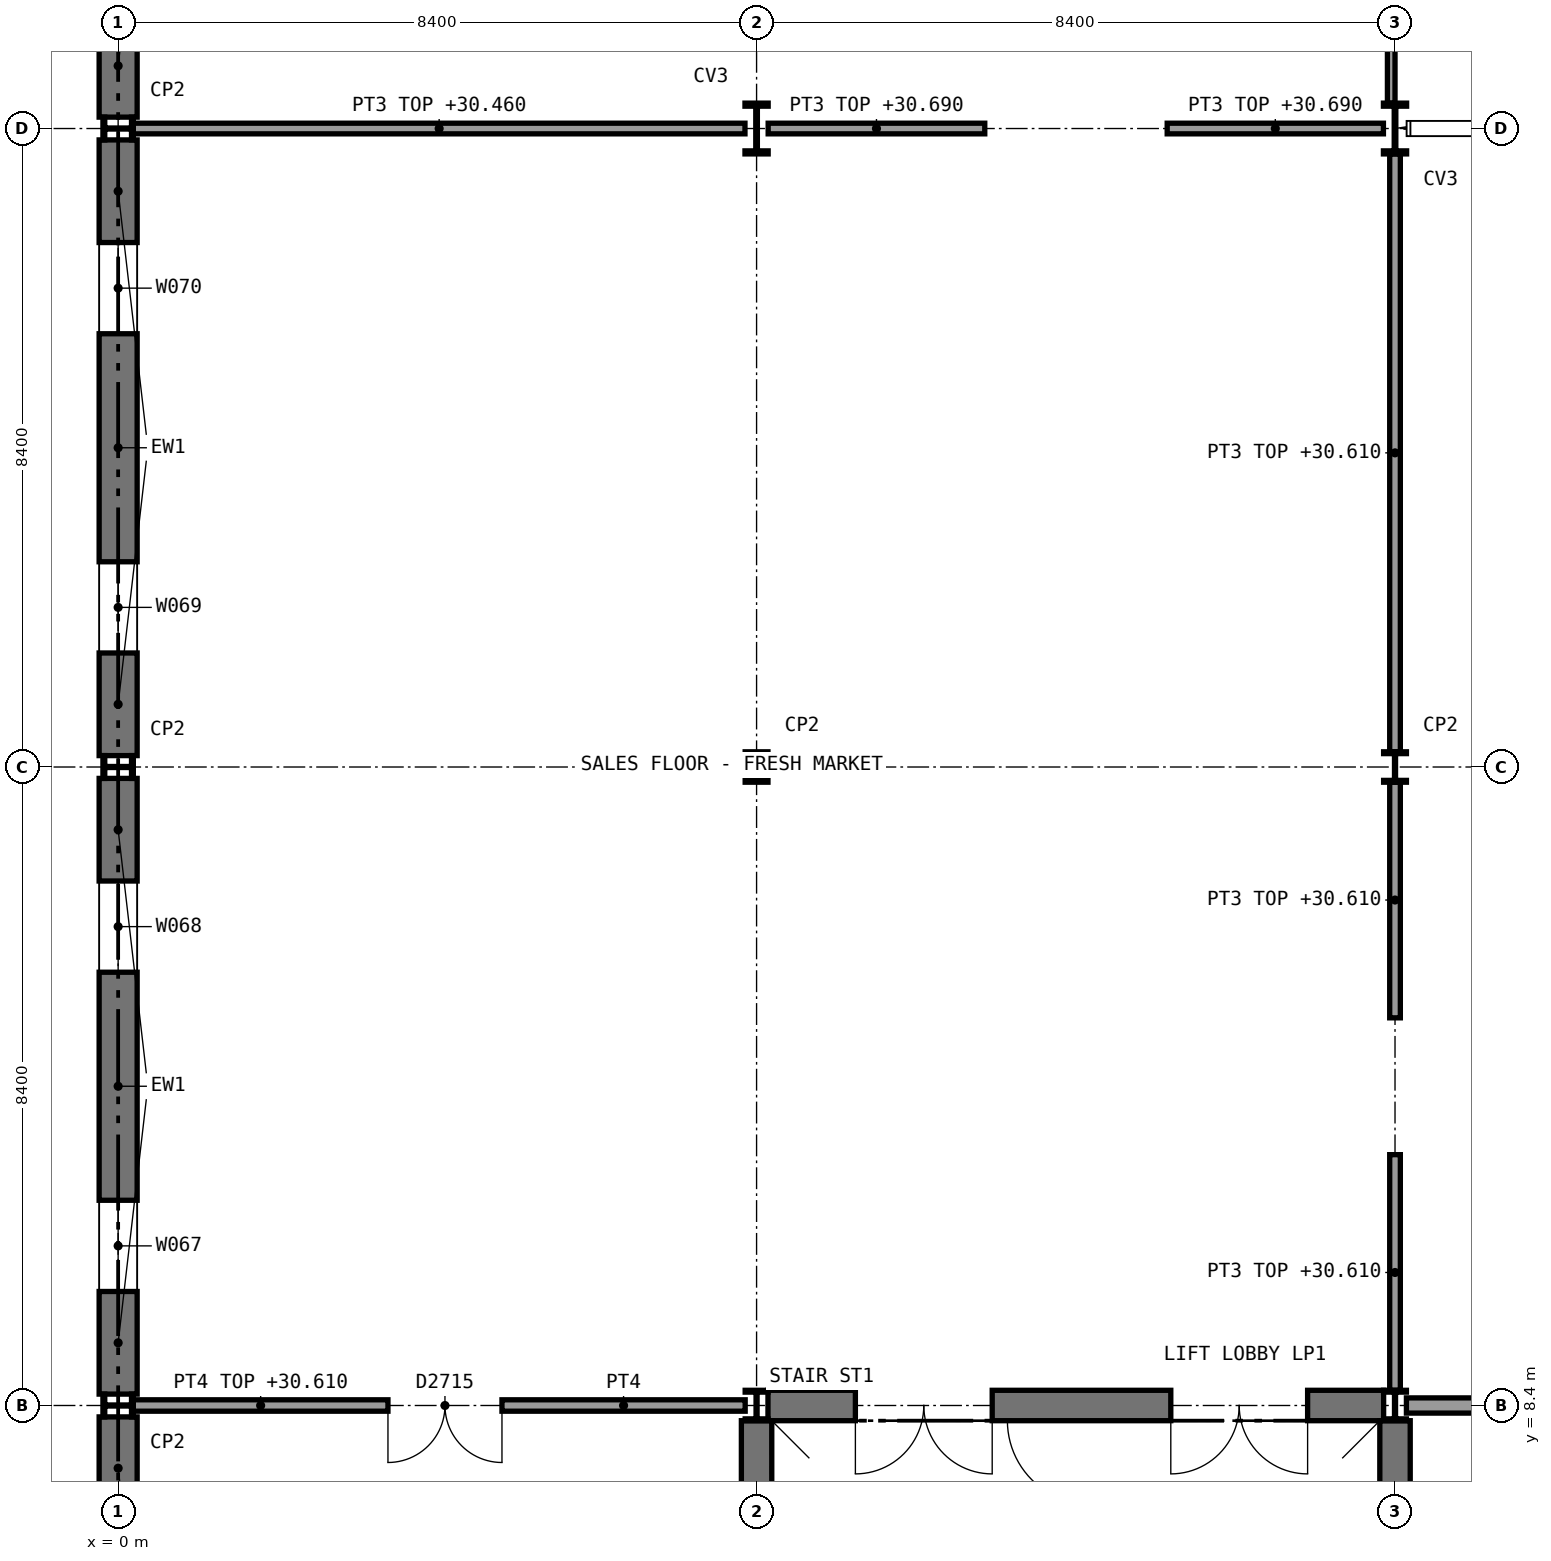
"""IFC4 building model, lengths in metres.
Left out: names, types, materials, properties, quantities, classifications, styles, units other than length and angle.
Written with IfcOpenShell. Run it as: python <this file> out.ifc"""

import sys

from ifc_helpers import new_model, si_unit, direction, frame, frame_2d, origin, origin_2d, place, context, subcontext, project, spatial, rectangle, i_section, extrude, element, fill, save


model = new_model("IFC4")
c1 = context("Model", 3, precision=1e-05, world=origin(), true_north=direction((0.0, 1.0)))
c2 = subcontext(c1, "Body", "Model", "MODEL_VIEW")
j1 = project(units=[si_unit("LENGTHUNIT", "METRE"), si_unit("PLANEANGLEUNIT", "RADIAN")], contexts=[c1])
p1 = place(None, origin())
s1 = spatial("IfcSite", under=j1, at=p1, CompositionType="ELEMENT")
p2 = place(p1, origin())
s2 = spatial("IfcBuilding", under=s1, at=p2, CompositionType="ELEMENT")
p3 = place(p2, frame((0.0, 0.0, 25.8)))
s3 = spatial("IfcBuildingStorey", under=s2, at=p3, CompositionType="ELEMENT", Elevation=25.8)
p4 = place(p3, frame((8.55, 8.4, 0.0), z_axis=(0.0, 0.0, 1.0), x_axis=(1.0, 0.0, 0.0)))
e1 = element("IfcWall", 1, at=p4, inside=s3, PredefinedType="SHEAR", context=c2, shape_type="SweptSolid", body=[
    extrude(rectangle(XDim=8.1, YDim=0.4, at=frame_2d((4.05, 0.0))), origin(), (0.0, 0.0, 1.0), 4.51),
])
p5 = place(p4, frame((1.15, 0.0, 0.0)))
e2 = element("IfcOpeningElement", 2, at=p5, cuts=e1, PredefinedType="OPENING", context=c2, shape_type="SweptSolid", body=[
    extrude(rectangle(XDim=1.8, YDim=2.1, at=frame_2d((0.9, 1.05))), frame((0.0, 0.21, 0.0), z_axis=(0.0, -1.0, 0.0), x_axis=(1.0, 0.0, 0.0)), (0.0, 0.0, 1.0), 0.42),
])
p6 = place(p4, frame((5.3, 0.0, 0.0)))
e3 = element("IfcOpeningElement", 3, at=p6, cuts=e1, PredefinedType="OPENING", context=c2, shape_type="SweptSolid", body=[
    extrude(rectangle(XDim=1.8, YDim=2.1, at=frame_2d((0.9, 1.05))), frame((0.0, 0.21, 0.0), z_axis=(0.0, -1.0, 0.0), x_axis=(1.0, 0.0, 0.0)), (0.0, 0.0, 1.0), 0.42),
])
for number, where, z_axis, x_axis in (
    (4, (8.4, 0.2, 0.0), (0.0, 0.0, 1.0), (0.0, 1.0, 0.0)),
    (5, (16.8, 0.2, 0.0), (0.0, 0.0, 1.0), (0.0, 1.0, 0.0)),
):
    element("IfcWall", number, at=place(p3, frame(where, z_axis=z_axis, x_axis=x_axis)), inside=s3, PredefinedType="SHEAR", context=c2, shape_type="SweptSolid", body=[
        extrude(rectangle(XDim=8.0, YDim=0.4, at=frame_2d((4.0, 0.0))), origin(), (0.0, 0.0, 1.0), 5.2),
    ])
for number, where, z_axis, x_axis in (
    (6, (0.0, 8.4, 0.0), (0.0, 0.0, 1.0), (0.0, 1.0, 0.0)),
    (7, (0.0, 16.8, 0.0), (0.0, 0.0, 1.0), (0.0, 1.0, 0.0)),
    (8, (0.0, 25.2, 0.0), (0.0, 0.0, 1.0), (0.0, 1.0, 0.0)),
    (9, (8.4, 8.4, 0.0), (0.0, 0.0, 1.0), (1.0, 0.0, 0.0)),
    (10, (8.4, 16.8, 0.0), (0.0, 0.0, 1.0), (1.0, 0.0, 0.0)),
):
    element("IfcColumn", number, at=place(p3, frame(where, z_axis=z_axis, x_axis=x_axis)), inside=s3, PredefinedType="COLUMN", context=c2, shape_type="SweptSolid", body=[
        extrude(i_section(OverallWidth=0.3, OverallDepth=0.4, WebThickness=0.013, FlangeThickness=0.024, FilletRadius=0.027, at=origin_2d()), origin(), (0.0, 0.0, 1.0), 5.4),
    ])
p7 = place(p3, frame((8.4, 25.2, 0.0), z_axis=(0.0, 0.0, 1.0), x_axis=(1.0, 0.0, 0.0)))
e11 = element("IfcColumn", 11, at=p7, inside=s3, PredefinedType="COLUMN", context=c2, shape_type="SweptSolid", body=[
    extrude(i_section(OverallWidth=0.305, OverallDepth=0.668, WebThickness=0.021, FlangeThickness=0.04, FilletRadius=0.027, at=origin_2d()), origin(), (0.0, 0.0, 1.0), 5.4),
])
for number, where, z_axis, x_axis in (
    (12, (16.8, 8.4, 0.0), (0.0, 0.0, 1.0), (1.0, 0.0, 0.0)),
    (13, (16.8, 16.8, 0.0), (0.0, 0.0, 1.0), (1.0, 0.0, 0.0)),
):
    element("IfcColumn", number, at=place(p3, frame(where, z_axis=z_axis, x_axis=x_axis)), inside=s3, PredefinedType="COLUMN", context=c2, shape_type="SweptSolid", body=[
        extrude(i_section(OverallWidth=0.3, OverallDepth=0.4, WebThickness=0.013, FlangeThickness=0.024, FilletRadius=0.027, at=origin_2d()), origin(), (0.0, 0.0, 1.0), 5.4),
    ])
p8 = place(p3, frame((16.8, 25.2, 0.0), z_axis=(0.0, 0.0, 1.0), x_axis=(1.0, 0.0, 0.0)))
e14 = element("IfcColumn", 14, at=p8, inside=s3, PredefinedType="COLUMN", context=c2, shape_type="SweptSolid", body=[
    extrude(i_section(OverallWidth=0.305, OverallDepth=0.668, WebThickness=0.021, FlangeThickness=0.04, FilletRadius=0.027, at=origin_2d()), origin(), (0.0, 0.0, 1.0), 5.4),
])
p9 = place(p3, frame((16.95, 8.4, 0.0), z_axis=(0.0, 0.0, 1.0), x_axis=(1.0, 0.0, 0.0)))
e15 = element("IfcWall", 15, at=p9, inside=s3, PredefinedType="SOLIDWALL", context=c2, shape_type="SweptSolid", body=[
    extrude(rectangle(XDim=8.1, YDim=0.2, at=frame_2d((4.05, 0.0))), origin(), (0.0, 0.0, 1.0), 4.89),
])
p10 = place(p9, frame((3.35, 0.0, 0.0)))
e16 = element("IfcOpeningElement", 16, at=p10, cuts=e15, PredefinedType="OPENING", context=c2, shape_type="SweptSolid", body=[
    extrude(rectangle(XDim=1.2, YDim=2.1, at=frame_2d((0.6, 1.05))), frame((0.0, 0.11, 0.0), z_axis=(0.0, -1.0, 0.0), x_axis=(1.0, 0.0, 0.0)), (0.0, 0.0, 1.0), 0.22),
])
p11 = place(p3, frame((0.2, 8.4, 0.0), z_axis=(0.0, 0.0, 1.0), x_axis=(1.0, 0.0, 0.0)))
e17 = element("IfcWall", 17, at=p11, inside=s3, PredefinedType="SOLIDWALL", context=c2, shape_type="SweptSolid", body=[
    extrude(rectangle(XDim=8.05, YDim=0.15, at=frame_2d((4.025, 0.0))), origin(), (0.0, 0.0, 1.0), 4.81),
])
p12 = place(p11, frame((3.35, 0.0, 0.0)))
e18 = element("IfcOpeningElement", 18, at=p12, cuts=e17, PredefinedType="OPENING", context=c2, shape_type="SweptSolid", body=[
    extrude(rectangle(XDim=1.5, YDim=2.1, at=frame_2d((0.75, 1.05))), frame((0.0, 0.085, 0.0), z_axis=(0.0, -1.0, 0.0), x_axis=(1.0, 0.0, 0.0)), (0.0, 0.0, 1.0), 0.17),
])
for number, where, z_axis, x_axis in (
    (19, (16.8, 8.6, 0.0), (0.0, 0.0, 1.0), (0.0, 1.0, 0.0)),
    (20, (16.8, 13.5, 0.0), (0.0, 0.0, 1.0), (0.0, 1.0, 0.0)),
):
    element("IfcWall", number, at=place(p3, frame(where, z_axis=z_axis, x_axis=x_axis)), inside=s3, PredefinedType="PARTITIONING", context=c2, shape_type="SweptSolid", body=[
        extrude(rectangle(XDim=3.1, YDim=0.14, at=frame_2d((1.55, 0.0))), origin(), (0.0, 0.0, 1.0), 4.81),
    ])
p13 = place(p3, frame((16.8, 17.0, 0.0), z_axis=(0.0, 0.0, 1.0), x_axis=(0.0, 1.0, 0.0)))
e21 = element("IfcWall", 21, at=p13, inside=s3, PredefinedType="PARTITIONING", context=c2, shape_type="SweptSolid", body=[
    extrude(rectangle(XDim=7.866, YDim=0.14, at=frame_2d((3.933, 0.0))), origin(), (0.0, 0.0, 1.0), 4.81),
])
p14 = place(p3, frame((0.2, 25.2, 0.0), z_axis=(0.0, 0.0, 1.0), x_axis=(1.0, 0.0, 0.0)))
e22 = element("IfcWall", 22, at=p14, inside=s3, PredefinedType="PARTITIONING", context=c2, shape_type="SweptSolid", body=[
    extrude(rectangle(XDim=8.047, YDim=0.14, at=frame_2d((4.024, 0.0))), origin(), (0.0, 0.0, 1.0), 4.66),
])
p15 = place(p3, frame((8.552, 25.2, 0.0), z_axis=(0.0, 0.0, 1.0), x_axis=(1.0, 0.0, 0.0)))
e23 = element("IfcWall", 23, at=p15, inside=s3, PredefinedType="PARTITIONING", context=c2, shape_type="SweptSolid", body=[
    extrude(rectangle(XDim=2.85, YDim=0.14, at=frame_2d((1.425, 0.0))), origin(), (0.0, 0.0, 1.0), 4.89),
])
p16 = place(p3, frame((13.802, 25.2, 0.0), z_axis=(0.0, 0.0, 1.0), x_axis=(1.0, 0.0, 0.0)))
e24 = element("IfcWall", 24, at=p16, inside=s3, PredefinedType="PARTITIONING", context=c2, shape_type="SweptSolid", body=[
    extrude(rectangle(XDim=2.845, YDim=0.14, at=frame_2d((1.422, 0.0))), origin(), (0.0, 0.0, 1.0), 4.89),
])
p17 = place(p3, frame((0.0, 0.15, 0.0), z_axis=(0.0, 0.0, 1.0), x_axis=(0.0, 1.0, 0.0)))
e25 = element("IfcWall", 25, at=p17, inside=s3, PredefinedType="STANDARD", context=c2, shape_type="SweptSolid", body=[
    extrude(rectangle(XDim=8.1, YDim=0.5, at=frame_2d((4.05, 0.0))), origin(), (0.0, 0.0, 1.0), 5.2),
])
p18 = place(p17, frame((1.35, 0.0, 2.7)))
e26 = element("IfcOpeningElement", 26, at=p18, cuts=e25, PredefinedType="OPENING", context=c2, shape_type="SweptSolid", body=[
    extrude(rectangle(XDim=1.2, YDim=1.2, at=frame_2d((0.6, 0.6))), frame((0.0, 0.26, 0.0), z_axis=(0.0, -1.0, 0.0), x_axis=(1.0, 0.0, 0.0)), (0.0, 0.0, 1.0), 0.52),
])
p19 = place(p17, frame((5.55, 0.0, 2.7)))
e27 = element("IfcOpeningElement", 27, at=p19, cuts=e25, PredefinedType="OPENING", context=c2, shape_type="SweptSolid", body=[
    extrude(rectangle(XDim=1.2, YDim=1.2, at=frame_2d((0.6, 0.6))), frame((0.0, 0.26, 0.0), z_axis=(0.0, -1.0, 0.0), x_axis=(1.0, 0.0, 0.0)), (0.0, 0.0, 1.0), 0.52),
])
p20 = place(p3, frame((0.0, 8.55, 0.0), z_axis=(0.0, 0.0, 1.0), x_axis=(0.0, 1.0, 0.0)))
e28 = element("IfcWall", 28, at=p20, inside=s3, PredefinedType="STANDARD", context=c2, shape_type="SweptSolid", body=[
    extrude(rectangle(XDim=8.1, YDim=0.5, at=frame_2d((4.05, 0.0))), origin(), (0.0, 0.0, 1.0), 5.2),
])
p21 = place(p20, frame((1.35, 0.0, 2.7)))
e29 = element("IfcOpeningElement", 29, at=p21, cuts=e28, PredefinedType="OPENING", context=c2, shape_type="SweptSolid", body=[
    extrude(rectangle(XDim=1.2, YDim=1.2, at=frame_2d((0.6, 0.6))), frame((0.0, 0.26, 0.0), z_axis=(0.0, -1.0, 0.0), x_axis=(1.0, 0.0, 0.0)), (0.0, 0.0, 1.0), 0.52),
])
p22 = place(p20, frame((5.55, 0.0, 2.7)))
e30 = element("IfcOpeningElement", 30, at=p22, cuts=e28, PredefinedType="OPENING", context=c2, shape_type="SweptSolid", body=[
    extrude(rectangle(XDim=1.2, YDim=1.2, at=frame_2d((0.6, 0.6))), frame((0.0, 0.26, 0.0), z_axis=(0.0, -1.0, 0.0), x_axis=(1.0, 0.0, 0.0)), (0.0, 0.0, 1.0), 0.52),
])
p23 = place(p3, frame((0.0, 16.95, 0.0), z_axis=(0.0, 0.0, 1.0), x_axis=(0.0, 1.0, 0.0)))
e31 = element("IfcWall", 31, at=p23, inside=s3, PredefinedType="STANDARD", context=c2, shape_type="SweptSolid", body=[
    extrude(rectangle(XDim=8.1, YDim=0.5, at=frame_2d((4.05, 0.0))), origin(), (0.0, 0.0, 1.0), 5.2),
])
p24 = place(p23, frame((1.35, 0.0, 2.7)))
e32 = element("IfcOpeningElement", 32, at=p24, cuts=e31, PredefinedType="OPENING", context=c2, shape_type="SweptSolid", body=[
    extrude(rectangle(XDim=1.2, YDim=1.2, at=frame_2d((0.6, 0.6))), frame((0.0, 0.26, 0.0), z_axis=(0.0, -1.0, 0.0), x_axis=(1.0, 0.0, 0.0)), (0.0, 0.0, 1.0), 0.52),
])
p25 = place(p23, frame((5.55, 0.0, 2.7)))
e33 = element("IfcOpeningElement", 33, at=p25, cuts=e31, PredefinedType="OPENING", context=c2, shape_type="SweptSolid", body=[
    extrude(rectangle(XDim=1.2, YDim=1.2, at=frame_2d((0.6, 0.6))), frame((0.0, 0.26, 0.0), z_axis=(0.0, -1.0, 0.0), x_axis=(1.0, 0.0, 0.0)), (0.0, 0.0, 1.0), 0.52),
])
p26 = place(p3, frame((0.0, 25.35, 0.0), z_axis=(0.0, 0.0, 1.0), x_axis=(0.0, 1.0, 0.0)))
e34 = element("IfcWall", 34, at=p26, inside=s3, PredefinedType="STANDARD", context=c2, shape_type="SweptSolid", body=[
    extrude(rectangle(XDim=12.3, YDim=0.5, at=frame_2d((6.15, 0.0))), origin(), (0.0, 0.0, 1.0), 5.2),
])
p27 = place(p26, frame((1.35, 0.0, 2.7)))
e35 = element("IfcOpeningElement", 35, at=p27, cuts=e34, PredefinedType="OPENING", context=c2, shape_type="SweptSolid", body=[
    extrude(rectangle(XDim=1.2, YDim=1.2, at=frame_2d((0.6, 0.6))), frame((0.0, 0.26, 0.0), z_axis=(0.0, -1.0, 0.0), x_axis=(1.0, 0.0, 0.0)), (0.0, 0.0, 1.0), 0.52),
])
p28 = place(p26, frame((5.55, 0.0, 2.7)))
e36 = element("IfcOpeningElement", 36, at=p28, cuts=e34, PredefinedType="OPENING", context=c2, shape_type="SweptSolid", body=[
    extrude(rectangle(XDim=1.2, YDim=1.2, at=frame_2d((0.6, 0.6))), frame((0.0, 0.26, 0.0), z_axis=(0.0, -1.0, 0.0), x_axis=(1.0, 0.0, 0.0)), (0.0, 0.0, 1.0), 0.52),
])
p29 = place(p26, frame((9.75, 0.0, 2.7)))
e37 = element("IfcOpeningElement", 37, at=p29, cuts=e34, PredefinedType="OPENING", context=c2, shape_type="SweptSolid", body=[
    extrude(rectangle(XDim=1.2, YDim=1.2, at=frame_2d((0.6, 0.6))), frame((0.0, 0.26, 0.0), z_axis=(0.0, -1.0, 0.0), x_axis=(1.0, 0.0, 0.0)), (0.0, 0.0, 1.0), 0.52),
])
p30 = place(p3, frame((12.8, 0.2, 0.0), z_axis=(0.0, 0.0, 1.0), x_axis=(0.0, 1.0, 0.0)))
e38 = element("IfcWall", 38, at=p30, inside=s3, PredefinedType="SHEAR", context=c2, shape_type="SweptSolid", body=[
    extrude(rectangle(XDim=8.0, YDim=0.2, at=frame_2d((4.0, 0.0))), origin(), (0.0, 0.0, 1.0), 5.2),
])
p31 = place(p30, frame((6.9, 0.0, 0.0)))
e39 = element("IfcOpeningElement", 39, at=p31, cuts=e38, PredefinedType="OPENING", context=c2, shape_type="SweptSolid", body=[
    extrude(rectangle(XDim=1.11, YDim=2.1, at=frame_2d((0.555, 1.05))), frame((0.0, 0.11, 0.0), z_axis=(0.0, -1.0, 0.0), x_axis=(1.0, 0.0, 0.0)), (0.0, 0.0, 1.0), 0.22),
])
p32 = place(p3, frame((16.75, 25.534, 0.0), z_axis=(0.0, 0.0, 1.0), x_axis=(0.0, 1.0, 0.0)))
e40 = element("IfcWall", 40, at=p32, inside=s3, PredefinedType="PARTITIONING", context=c2, shape_type="SweptSolid", body=[
    extrude(rectangle(XDim=11.932, YDim=0.1, at=frame_2d((5.966, 0.0))), origin(), (0.0, 0.0, 1.0), 4.51),
])
p33 = place(p12, frame((1.5, 0.0, 0.0), z_axis=(0.0, 0.0, 1.0), x_axis=(-1.0, 0.0, 0.0)))
e41 = element("IfcDoor", 41, at=p33, inside=s3, OperationType="DOUBLE_DOOR_SINGLE_SWING", PredefinedType="DOOR", context=c2, shape_type="SweptSolid", body=[
    extrude(rectangle(XDim=1.5, YDim=2.1, at=frame_2d((0.75, 1.05))), frame((0.0, 0.025, 0.0), z_axis=(0.0, -1.0, 0.0), x_axis=(1.0, 0.0, 0.0)), (0.0, 0.0, 1.0), 0.05),
])
fill(e18, e41)
p34 = place(p21, origin())
e42 = element("IfcWindow", 42, at=p34, inside=s3, PartitioningType="SINGLE_PANEL", PredefinedType="WINDOW", context=c2, shape_type="SweptSolid", body=[
    extrude(rectangle(XDim=1.2, YDim=1.2, at=frame_2d((0.6, 0.6))), frame((0.0, 0.03, 0.0), z_axis=(0.0, -1.0, 0.0), x_axis=(1.0, 0.0, 0.0)), (0.0, 0.0, 1.0), 0.06),
])
fill(e29, e42)
p35 = place(p22, origin())
e43 = element("IfcWindow", 43, at=p35, inside=s3, PartitioningType="SINGLE_PANEL", PredefinedType="WINDOW", context=c2, shape_type="SweptSolid", body=[
    extrude(rectangle(XDim=1.2, YDim=1.2, at=frame_2d((0.6, 0.6))), frame((0.0, 0.03, 0.0), z_axis=(0.0, -1.0, 0.0), x_axis=(1.0, 0.0, 0.0)), (0.0, 0.0, 1.0), 0.06),
])
fill(e30, e43)
p36 = place(p24, origin())
e44 = element("IfcWindow", 44, at=p36, inside=s3, PartitioningType="SINGLE_PANEL", PredefinedType="WINDOW", context=c2, shape_type="SweptSolid", body=[
    extrude(rectangle(XDim=1.2, YDim=1.2, at=frame_2d((0.6, 0.6))), frame((0.0, 0.03, 0.0), z_axis=(0.0, -1.0, 0.0), x_axis=(1.0, 0.0, 0.0)), (0.0, 0.0, 1.0), 0.06),
])
fill(e32, e44)
p37 = place(p25, origin())
e45 = element("IfcWindow", 45, at=p37, inside=s3, PartitioningType="SINGLE_PANEL", PredefinedType="WINDOW", context=c2, shape_type="SweptSolid", body=[
    extrude(rectangle(XDim=1.2, YDim=1.2, at=frame_2d((0.6, 0.6))), frame((0.0, 0.03, 0.0), z_axis=(0.0, -1.0, 0.0), x_axis=(1.0, 0.0, 0.0)), (0.0, 0.0, 1.0), 0.06),
])
fill(e33, e45)
p38 = place(p31, origin())
e46 = element("IfcDoor", 46, at=p38, inside=s3, OperationType="SINGLE_SWING_RIGHT", PredefinedType="DOOR", context=c2, shape_type="SweptSolid", body=[
    extrude(rectangle(XDim=1.1, YDim=2.1, at=frame_2d((0.55, 1.05))), frame((0.0, 0.025, 0.0), z_axis=(0.0, -1.0, 0.0), x_axis=(1.0, 0.0, 0.0)), (0.0, 0.0, 1.0), 0.05),
])
fill(e39, e46)
p39 = place(p5, frame((1.8, 0.0, 0.0), z_axis=(0.0, 0.0, 1.0), x_axis=(-1.0, 0.0, 0.0)))
e47 = element("IfcDoor", 47, at=p39, inside=s3, OperationType="DOUBLE_DOOR_SINGLE_SWING", PredefinedType="DOOR", context=c2, shape_type="SweptSolid", body=[
    extrude(rectangle(XDim=1.8, YDim=2.1, at=frame_2d((0.9, 1.05))), frame((0.0, 0.025, 0.0), z_axis=(0.0, -1.0, 0.0), x_axis=(1.0, 0.0, 0.0)), (0.0, 0.0, 1.0), 0.05),
])
fill(e2, e47)
p40 = place(p6, frame((1.8, 0.0, 0.0), z_axis=(0.0, 0.0, 1.0), x_axis=(-1.0, 0.0, 0.0)))
e48 = element("IfcDoor", 48, at=p40, inside=s3, OperationType="DOUBLE_DOOR_SINGLE_SWING", PredefinedType="DOOR", context=c2, shape_type="SweptSolid", body=[
    extrude(rectangle(XDim=1.8, YDim=2.1, at=frame_2d((0.9, 1.05))), frame((0.0, 0.025, 0.0), z_axis=(0.0, -1.0, 0.0), x_axis=(1.0, 0.0, 0.0)), (0.0, 0.0, 1.0), 0.05),
])
fill(e3, e48)
save(model, sys.argv[1])
